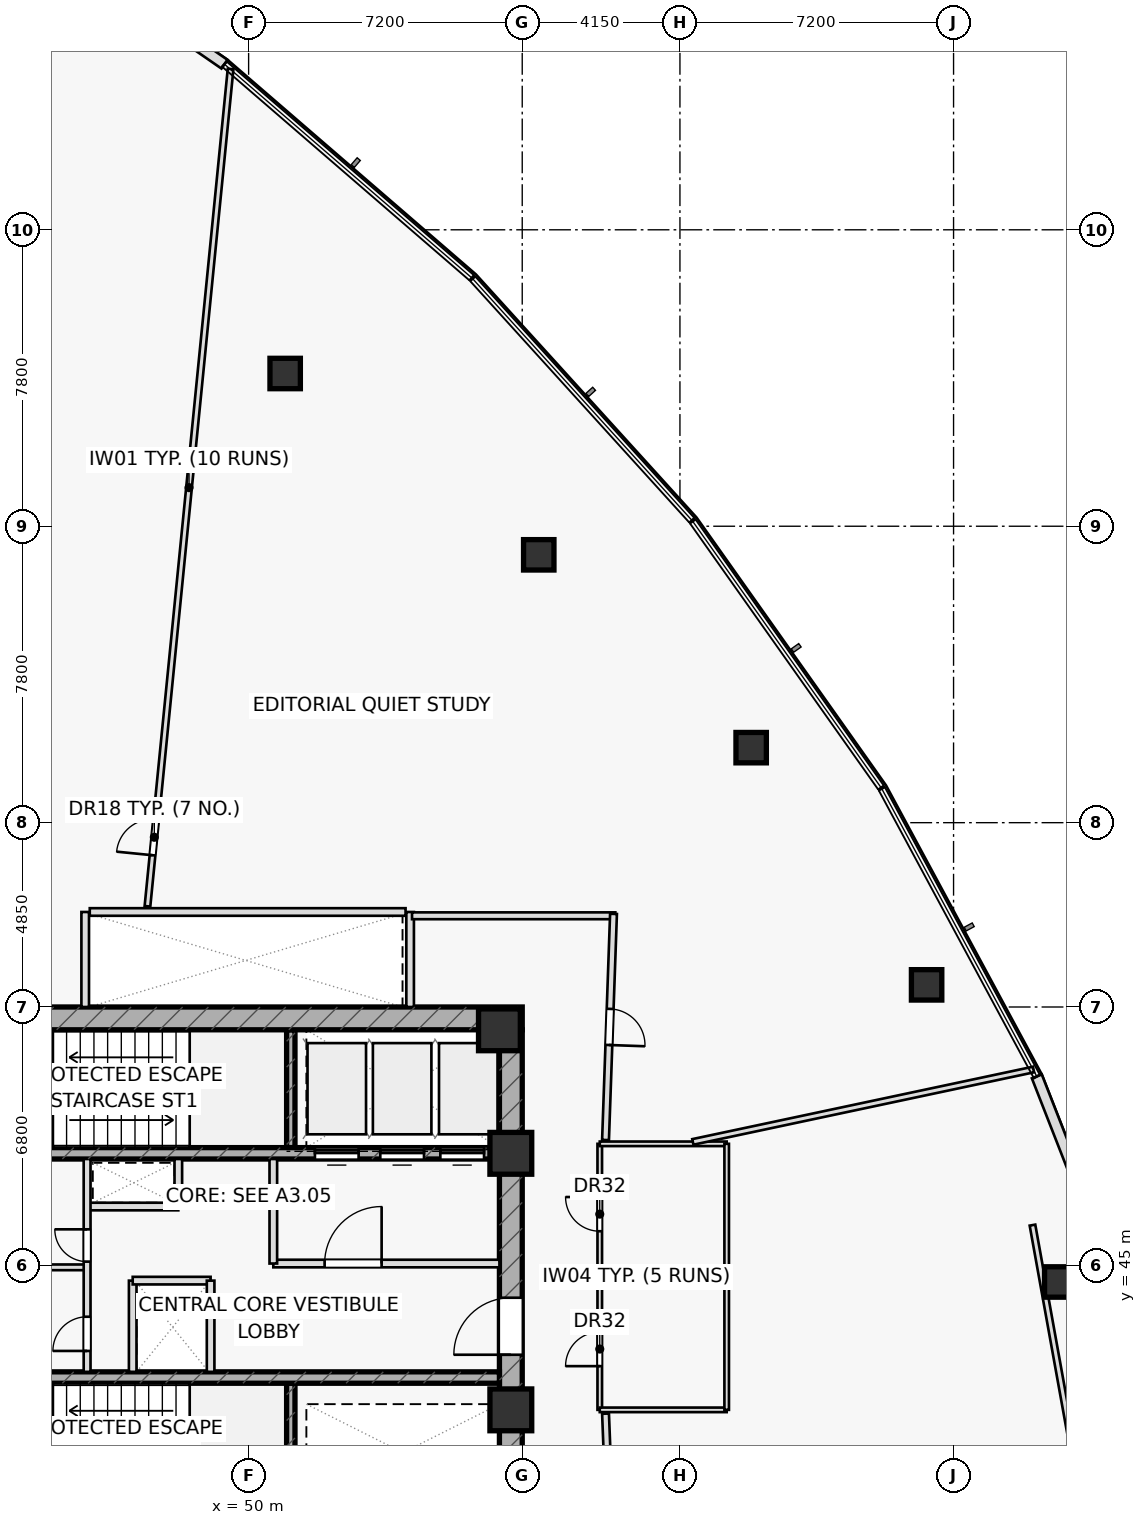
"""IFC4 building model, lengths in metres.
Left out: names, types, materials, properties, quantities, classifications, styles, units other than length and angle.
Written with IfcOpenShell. Run it as: python <this file> out.ifc"""

import sys

from ifc_helpers import new_model, si_unit, direction, frame, frame_2d, origin, origin_2d, place, context, subcontext, project, spatial, rectangle, hollow_rectangle, extrude, element, fill, save


model = new_model("IFC4")
c1 = context("Model", 3, precision=1e-05, world=origin(), true_north=direction((0.0, 1.0)))
c2 = subcontext(c1, "Body", "Model", "MODEL_VIEW")
j1 = project(units=[si_unit("LENGTHUNIT", "METRE"), si_unit("PLANEANGLEUNIT", "RADIAN")], contexts=[c1])
p1 = place(None, origin())
s1 = spatial("IfcSite", under=j1, at=p1, CompositionType="ELEMENT")
p2 = place(p1, origin())
s2 = spatial("IfcBuilding", under=s1, at=p2, CompositionType="ELEMENT")
p3 = place(p2, frame((0.0, 0.0, 31.5)))
s3 = spatial("IfcBuildingStorey", under=s2, at=p3, CompositionType="ELEMENT", Elevation=31.5)
for number, where, z_axis, x_axis in (
    (1, (51.11, 48.1, 0.0), (0.0, 0.0, 1.0), (0.0, 1.0, 0.0)),
    (2, (51.11, 38.8, 0.0), (0.0, 0.0, 1.0), (0.0, 1.0, 0.0)),
):
    element("IfcWall", number, at=place(p3, frame(where, z_axis=z_axis, x_axis=x_axis)), inside=s3, PredefinedType="SHEAR", context=c2, shape_type="SweptSolid", body=[
        extrude(rectangle(XDim=3.1, YDim=0.22, at=frame_2d((1.55, 0.0))), origin(), (0.0, 0.0, 1.0), 3.6),
    ])
p4 = place(p3, frame((42.8, 51.5, 0.0), z_axis=(0.0, 0.0, 1.0), x_axis=(1.0, 0.0, 0.0)))
e3 = element("IfcWall", 3, at=p4, inside=s3, PredefinedType="SHEAR", context=c2, shape_type="SweptSolid", body=[
    extrude(rectangle(XDim=14.4, YDim=0.6, at=frame_2d((7.2, 0.0))), origin(), (0.0, 0.0, 1.0), 3.6),
])
p5 = place(p4, frame((0.88, 0.0, 0.0)))
e4 = element("IfcOpeningElement", 4, at=p5, cuts=e3, PredefinedType="OPENING", context=c2, shape_type="SweptSolid", body=[
    extrude(rectangle(XDim=1.05, YDim=2.2, at=frame_2d((0.525, 1.1))), frame((0.0, 0.31, 0.0), z_axis=(0.0, -1.0, 0.0), x_axis=(1.0, 0.0, 0.0)), (0.0, 0.0, 1.0), 0.62),
])
p6 = place(p3, frame((56.9, 38.8, 0.0), z_axis=(0.0, 0.0, 1.0), x_axis=(0.0, 1.0, 0.0)))
e5 = element("IfcWall", 5, at=p6, inside=s3, PredefinedType="SHEAR", context=c2, shape_type="SweptSolid", body=[
    extrude(rectangle(XDim=12.4, YDim=0.6, at=frame_2d((6.2, 0.0))), origin(), (0.0, 0.0, 1.0), 3.6),
])
p7 = place(p6, frame((3.85, 0.0, 0.0)))
e6 = element("IfcOpeningElement", 6, at=p7, cuts=e5, PredefinedType="OPENING", context=c2, shape_type="SweptSolid", body=[
    extrude(rectangle(XDim=1.5, YDim=2.2, at=frame_2d((0.75, 1.1))), frame((0.0, 0.31, 0.0), z_axis=(0.0, -1.0, 0.0), x_axis=(1.0, 0.0, 0.0)), (0.0, 0.0, 1.0), 0.62),
])
p8 = place(p3, frame((43.4, 47.95, 0.0), z_axis=(0.0, 0.0, 1.0), x_axis=(1.0, 0.0, 0.0)))
e7 = element("IfcWall", 7, at=p8, inside=s3, PredefinedType="SHEAR", context=c2, shape_type="SweptSolid", body=[
    extrude(rectangle(XDim=13.2, YDim=0.3, at=frame_2d((6.6, 0.0))), origin(), (0.0, 0.0, 1.0), 3.6),
])
p9 = place(p8, frame((8.345, 0.0, 0.0)))
e8 = element("IfcOpeningElement", 8, at=p9, cuts=e7, PredefinedType="OPENING", context=c2, shape_type="SweptSolid", body=[
    extrude(rectangle(XDim=1.15, YDim=2.2, at=frame_2d((0.575, 1.1))), frame((0.0, 0.16, 0.0), z_axis=(0.0, -1.0, 0.0), x_axis=(1.0, 0.0, 0.0)), (0.0, 0.0, 1.0), 0.32),
])
p10 = place(p8, frame((10.065, 0.0, 0.0)))
e9 = element("IfcOpeningElement", 9, at=p10, cuts=e7, PredefinedType="OPENING", context=c2, shape_type="SweptSolid", body=[
    extrude(rectangle(XDim=1.15, YDim=2.2, at=frame_2d((0.575, 1.1))), frame((0.0, 0.16, 0.0), z_axis=(0.0, -1.0, 0.0), x_axis=(1.0, 0.0, 0.0)), (0.0, 0.0, 1.0), 0.32),
])
p11 = place(p8, frame((11.645, 0.0, 0.0)))
e10 = element("IfcOpeningElement", 10, at=p11, cuts=e7, PredefinedType="OPENING", context=c2, shape_type="SweptSolid", body=[
    extrude(rectangle(XDim=1.15, YDim=2.2, at=frame_2d((0.575, 1.1))), frame((0.0, 0.16, 0.0), z_axis=(0.0, -1.0, 0.0), x_axis=(1.0, 0.0, 0.0)), (0.0, 0.0, 1.0), 0.32),
])
p12 = place(p3, frame((43.4, 42.05, 0.0), z_axis=(0.0, 0.0, 1.0), x_axis=(1.0, 0.0, 0.0)))
e11 = element("IfcWall", 11, at=p12, inside=s3, PredefinedType="SHEAR", context=c2, shape_type="SweptSolid", body=[
    extrude(rectangle(XDim=13.2, YDim=0.3, at=frame_2d((6.6, 0.0))), origin(), (0.0, 0.0, 1.0), 3.6),
])
for number, where, z_axis, x_axis in (
    (12, (56.9, 47.95, 0.0), (0.0, 0.0, 1.0), (1.0, 0.0, 0.0)),
    (13, (56.6, 51.2, 0.0), (0.0, 0.0, 1.0), (1.0, 0.0, 0.0)),
    (14, (56.9, 41.2, 0.0), (0.0, 0.0, 1.0), (1.0, 0.0, 0.0)),
):
    element("IfcColumn", number, at=place(p3, frame(where, z_axis=z_axis, x_axis=x_axis)), inside=s3, PredefinedType="COLUMN", context=c2, shape_type="SweptSolid", body=[
        extrude(rectangle(XDim=1.1, YDim=1.1, at=origin_2d()), origin(), (0.0, 0.0, 1.0), 3.6),
    ])
for number, where, z_axis, x_axis in (
    (15, (71.344, 44.565, 0.0), (0.0, 0.0, 1.0), (1.0, 0.0, 0.0)),
    (16, (67.841, 52.383, 0.0), (0.0, 0.0, 1.0), (1.0, 0.0, 0.0)),
    (17, (63.224, 58.624, 0.0), (0.0, 0.0, 1.0), (1.0, 0.0, 0.0)),
    (18, (57.635, 63.698, 0.0), (0.0, 0.0, 1.0), (1.0, 0.0, 0.0)),
    (19, (50.962, 68.469, 0.0), (0.0, 0.0, 1.0), (1.0, 0.0, 0.0)),
):
    element("IfcColumn", number, at=place(p3, frame(where, z_axis=z_axis, x_axis=x_axis)), inside=s3, PredefinedType="COLUMN", context=c2, shape_type="SweptSolid", body=[
        extrude(hollow_rectangle(XDim=0.8, YDim=0.8, WallThickness=0.045, at=origin_2d()), origin(), (0.0, 0.0, 1.0), 3.6),
    ])
for number, where, z_axis, x_axis in (
    (20, (45.7, 51.8, 0.0), (0.0, 0.0, 1.0), (0.0, 1.0, 0.0)),
    (21, (54.25, 51.8, 0.0), (0.0, 0.0, 1.0), (0.0, 1.0, 0.0)),
):
    element("IfcWall", number, at=place(p3, frame(where, z_axis=z_axis, x_axis=x_axis)), inside=s3, PredefinedType="PARTITIONING", context=c2, shape_type="SweptSolid", body=[
        extrude(rectangle(XDim=2.5, YDim=0.2, at=frame_2d((1.25, 0.0))), origin(), (0.0, 0.0, 1.0), 3.6),
    ])
p13 = place(p3, frame((45.75, 46.55, 0.0), z_axis=(0.0, 0.0, 1.0), x_axis=(1.0, 0.0, 0.0)))
e22 = element("IfcWall", 22, at=p13, inside=s3, PredefinedType="PARTITIONING", context=c2, shape_type="SweptSolid", body=[
    extrude(rectangle(XDim=2.4, YDim=0.2, at=frame_2d((1.2, 0.0))), origin(), (0.0, 0.0, 1.0), 3.6),
])
p14 = place(p3, frame((48.15, 46.55, 0.0), z_axis=(0.0, 0.0, 1.0), x_axis=(0.0, 1.0, 0.0)))
e23 = element("IfcWall", 23, at=p14, inside=s3, PredefinedType="PARTITIONING", context=c2, shape_type="SweptSolid", body=[
    extrude(rectangle(XDim=1.25, YDim=0.2, at=frame_2d((0.625, 0.0))), origin(), (0.0, 0.0, 1.0), 3.6),
])
p15 = place(p3, frame((46.95, 42.2, 0.0), z_axis=(0.0, 0.0, 1.0), x_axis=(0.0, 1.0, 0.0)))
e24 = element("IfcWall", 24, at=p15, inside=s3, PredefinedType="PARTITIONING", context=c2, shape_type="SweptSolid", body=[
    extrude(rectangle(XDim=2.4, YDim=0.2, at=frame_2d((1.2, 0.0))), origin(), (0.0, 0.0, 1.0), 3.6),
])
p16 = place(p3, frame((46.95, 44.6, 0.0), z_axis=(0.0, 0.0, 1.0), x_axis=(1.0, 0.0, 0.0)))
e25 = element("IfcWall", 25, at=p16, inside=s3, PredefinedType="PARTITIONING", context=c2, shape_type="SweptSolid", body=[
    extrude(rectangle(XDim=2.05, YDim=0.2, at=frame_2d((1.025, 0.0))), origin(), (0.0, 0.0, 1.0), 3.6),
])
p17 = place(p3, frame((50.65, 45.05, 0.0), z_axis=(0.0, 0.0, 1.0), x_axis=(1.0, 0.0, 0.0)))
e26 = element("IfcWall", 26, at=p17, inside=s3, PredefinedType="PARTITIONING", context=c2, shape_type="SweptSolid", body=[
    extrude(rectangle(XDim=5.95, YDim=0.2, at=frame_2d((2.975, 0.0))), origin(), (0.0, 0.0, 1.0), 3.6),
])
p18 = place(p17, frame((1.35, 0.0, 0.0)))
e27 = element("IfcOpeningElement", 27, at=p18, cuts=e26, PredefinedType="OPENING", context=c2, shape_type="SweptSolid", body=[
    extrude(rectangle(XDim=1.5, YDim=2.2, at=frame_2d((0.75, 1.1))), frame((0.0, 0.11, 0.0), z_axis=(0.0, -1.0, 0.0), x_axis=(1.0, 0.0, 0.0)), (0.0, 0.0, 1.0), 0.22),
])
p19 = place(p3, frame((50.65, 45.05, 0.0), z_axis=(0.0, 0.0, 1.0), x_axis=(0.0, 1.0, 0.0)))
e28 = element("IfcWall", 28, at=p19, inside=s3, PredefinedType="PARTITIONING", context=c2, shape_type="SweptSolid", body=[
    extrude(rectangle(XDim=2.75, YDim=0.2, at=frame_2d((1.375, 0.0))), origin(), (0.0, 0.0, 1.0), 3.6),
])
p20 = place(p3, frame((43.4, 44.95, 0.0), z_axis=(0.0, 0.0, 1.0), x_axis=(1.0, 0.0, 0.0)))
e29 = element("IfcWall", 29, at=p20, inside=s3, PredefinedType="PARTITIONING", context=c2, shape_type="SweptSolid", body=[
    extrude(rectangle(XDim=2.35, YDim=0.15, at=frame_2d((1.175, 0.0))), origin(), (0.0, 0.0, 1.0), 3.6),
])
p21 = place(p3, frame((45.75, 42.2, 0.0), z_axis=(0.0, 0.0, 1.0), x_axis=(0.0, 1.0, 0.0)))
e30 = element("IfcWall", 30, at=p21, inside=s3, PredefinedType="PARTITIONING", context=c2, shape_type="SweptSolid", body=[
    extrude(rectangle(XDim=5.6, YDim=0.18, at=frame_2d((2.8, 0.0))), origin(), (0.0, 0.0, 1.0), 3.6),
])
p22 = place(p21, frame((0.55, 0.0, 0.0)))
e31 = element("IfcOpeningElement", 31, at=p22, cuts=e30, PredefinedType="OPENING", context=c2, shape_type="SweptSolid", body=[
    extrude(rectangle(XDim=0.9, YDim=2.05, at=frame_2d((0.45, 1.025))), frame((0.0, 0.1, 0.0), z_axis=(0.0, -1.0, 0.0), x_axis=(1.0, 0.0, 0.0)), (0.0, 0.0, 1.0), 0.2),
])
p23 = place(p21, frame((2.9, 0.0, 0.0)))
e32 = element("IfcOpeningElement", 32, at=p23, cuts=e30, PredefinedType="OPENING", context=c2, shape_type="SweptSolid", body=[
    extrude(rectangle(XDim=0.85, YDim=2.05, at=frame_2d((0.425, 1.025))), frame((0.0, 0.1, 0.0), z_axis=(0.0, -1.0, 0.0), x_axis=(1.0, 0.0, 0.0)), (0.0, 0.0, 1.0), 0.2),
])
p24 = place(p3, frame((72.969, 33.091, 0.0), z_axis=(0.0, 0.0, 1.0), x_axis=(-0.177742578179, 0.984077017261, 0.0)))
e33 = element("IfcWall", 33, at=p24, inside=s3, PredefinedType="PARTITIONING", context=c2, shape_type="SweptSolid", body=[
    extrude(rectangle(XDim=13.179, YDim=0.15, at=frame_2d((6.59, 0.0))), origin(), (0.0, 0.0, 1.0), 2.925),
])
p25 = place(p3, frame((59.24, 41.2, 0.0), z_axis=(0.0, 0.0, 1.0), x_axis=(0.0, 1.0, 0.0)))
e34 = element("IfcWall", 34, at=p25, inside=s3, PredefinedType="PARTITIONING", context=c2, shape_type="SweptSolid", body=[
    extrude(rectangle(XDim=7.0, YDim=0.12, at=frame_2d((3.5, 0.0))), origin(), (0.0, 0.0, 1.0), 3.6),
])
p26 = place(p25, frame((1.15, 0.0, 0.0)))
e35 = element("IfcOpeningElement", 35, at=p26, cuts=e34, PredefinedType="OPENING", context=c2, shape_type="SweptSolid", body=[
    extrude(rectangle(XDim=0.9, YDim=2.05, at=frame_2d((0.45, 1.025))), frame((0.0, 0.07, 0.0), z_axis=(0.0, -1.0, 0.0), x_axis=(1.0, 0.0, 0.0)), (0.0, 0.0, 1.0), 0.14),
])
p27 = place(p25, frame((4.7, 0.0, 0.0)))
e36 = element("IfcOpeningElement", 36, at=p27, cuts=e34, PredefinedType="OPENING", context=c2, shape_type="SweptSolid", body=[
    extrude(rectangle(XDim=0.9, YDim=2.05, at=frame_2d((0.45, 1.025))), frame((0.0, 0.07, 0.0), z_axis=(0.0, -1.0, 0.0), x_axis=(1.0, 0.0, 0.0)), (0.0, 0.0, 1.0), 0.14),
])
p28 = place(p3, frame((59.24, 41.2, 0.0), z_axis=(0.0, 0.0, 1.0), x_axis=(1.0, 0.0, 0.0)))
e37 = element("IfcWall", 37, at=p28, inside=s3, PredefinedType="PARTITIONING", context=c2, shape_type="SweptSolid", body=[
    extrude(rectangle(XDim=3.34, YDim=0.12, at=frame_2d((1.67, 0.0))), origin(), (0.0, 0.0, 1.0), 2.925),
])
for number, where, z_axis, x_axis in (
    (38, (59.24, 44.65, 0.0), (0.0, 0.0, 1.0), (1.0, 0.0, 0.0)),
    (39, (59.24, 48.2, 0.0), (0.0, 0.0, 1.0), (1.0, 0.0, 0.0)),
):
    element("IfcWall", number, at=place(p3, frame(where, z_axis=z_axis, x_axis=x_axis)), inside=s3, PredefinedType="PARTITIONING", context=c2, shape_type="SweptSolid", body=[
        extrude(rectangle(XDim=3.34, YDim=0.12, at=frame_2d((1.67, 0.0))), origin(), (0.0, 0.0, 1.0), 3.6),
    ])
p29 = place(p3, frame((62.58, 41.2, 0.0), z_axis=(0.0, 0.0, 1.0), x_axis=(0.0, 1.0, 0.0)))
e40 = element("IfcWall", 40, at=p29, inside=s3, PredefinedType="PARTITIONING", context=c2, shape_type="SweptSolid", body=[
    extrude(rectangle(XDim=7.0, YDim=0.12, at=frame_2d((3.5, 0.0))), origin(), (0.0, 0.0, 1.0), 3.6),
])
p30 = place(p3, frame((61.69, 48.25, 0.0), z_axis=(0.0, 0.0, 1.0), x_axis=(0.978145714451, 0.207920564881, 0.0)))
e41 = element("IfcWall", 41, at=p30, inside=s3, PredefinedType="PARTITIONING", context=c2, shape_type="SweptSolid", body=[
    extrude(rectangle(XDim=9.165, YDim=0.15, at=frame_2d((4.582, 0.0))), origin(), (0.0, 0.0, 1.0), 2.975),
])
p31 = place(p3, frame((47.338, 54.45, 0.0), z_axis=(0.0, 0.0, 1.0), x_axis=(0.098804932586, 0.995106821048, 0.0)))
e42 = element("IfcWall", 42, at=p31, inside=s3, PredefinedType="PARTITIONING", context=c2, shape_type="SweptSolid", body=[
    extrude(rectangle(XDim=22.14, YDim=0.15, at=frame_2d((11.07, 0.0))), origin(), (0.0, 0.0, 1.0), 2.975),
])
p32 = place(p31, frame((1.35, 0.0, 0.0)))
e43 = element("IfcOpeningElement", 43, at=p32, cuts=e42, PredefinedType="OPENING", context=c2, shape_type="SweptSolid", body=[
    extrude(rectangle(XDim=0.95, YDim=2.05, at=frame_2d((0.475, 1.025))), frame((0.0, 0.085, 0.0), z_axis=(0.0, -1.0, 0.0), x_axis=(1.0, 0.0, 0.0)), (0.0, 0.0, 1.0), 0.17),
])
p33 = place(p3, frame((54.3, 54.2, 0.0), z_axis=(0.0, 0.0, 1.0), x_axis=(1.0, 0.0, 0.0)))
e44 = element("IfcWall", 44, at=p33, inside=s3, PredefinedType="PARTITIONING", context=c2, shape_type="SweptSolid", body=[
    extrude(rectangle(XDim=5.35, YDim=0.18, at=frame_2d((2.675, 0.0))), origin(), (0.0, 0.0, 1.0), 2.925),
])
p34 = place(p3, frame((59.602, 54.25, 0.0), z_axis=(0.0, 0.0, 1.0), x_axis=(-0.035265891834, -0.999377964973, 0.0)))
e45 = element("IfcWall", 45, at=p34, inside=s3, PredefinedType="PARTITIONING", context=c2, shape_type="SweptSolid", body=[
    extrude(rectangle(XDim=5.954, YDim=0.18, at=frame_2d((2.977, 0.0))), origin(), (0.0, 0.0, 1.0), 2.925),
])
p35 = place(p34, frame((2.502, 0.0, 0.0)))
e46 = element("IfcOpeningElement", 46, at=p35, cuts=e45, PredefinedType="OPENING", context=c2, shape_type="SweptSolid", body=[
    extrude(rectangle(XDim=0.95, YDim=2.05, at=frame_2d((0.475, 1.025))), frame((0.0, 0.1, 0.0), z_axis=(0.0, -1.0, 0.0), x_axis=(1.0, 0.0, 0.0)), (0.0, 0.0, 1.0), 0.2),
])
p36 = place(p3, frame((59.392, 41.1, 0.0), z_axis=(0.0, 0.0, 1.0), x_axis=(0.03921413315, -0.999230830069, 0.0)))
e47 = element("IfcWall", 47, at=p36, inside=s3, PredefinedType="PARTITIONING", context=c2, shape_type="SweptSolid", body=[
    extrude(rectangle(XDim=5.354, YDim=0.18, at=frame_2d((2.677, 0.0))), origin(), (0.0, 0.0, 1.0), 2.925),
])
p37 = place(p36, frame((2.037, 0.0, 0.0)))
e48 = element("IfcOpeningElement", 48, at=p37, cuts=e47, PredefinedType="OPENING", context=c2, shape_type="SweptSolid", body=[
    extrude(rectangle(XDim=0.95, YDim=2.05, at=frame_2d((0.475, 1.025))), frame((0.0, 0.1, 0.0), z_axis=(0.0, -1.0, 0.0), x_axis=(1.0, 0.0, 0.0)), (0.0, 0.0, 1.0), 0.2),
])
p38 = place(p3, frame((49.365, 76.607, 0.0), z_axis=(0.0, 0.0, 1.0), x_axis=(-0.822668510747, 0.568521346499, 0.0)))
e49 = element("IfcWall", 49, at=p38, inside=s3, PredefinedType="STANDARD", context=c2, shape_type="SweptSolid", body=[
    extrude(rectangle(XDim=2.25, YDim=0.28, at=frame_2d((1.125, 0.0))), origin(), (0.0, 0.0, 1.0), 3.6),
])
p39 = place(p3, frame((73.889, 41.932, 0.0), z_axis=(0.0, 0.0, 1.0), x_axis=(-0.364469689699, 0.931215251857, 0.0)))
e50 = element("IfcWall", 50, at=p39, inside=s3, PredefinedType="STANDARD", context=c2, shape_type="SweptSolid", body=[
    extrude(rectangle(XDim=8.637, YDim=0.28, at=frame_2d((4.318, 0.0))), origin(), (0.0, 0.0, 1.0), 3.6),
])
p40 = place(p3, frame((49.0, 42.2, 0.0), z_axis=(0.0, 0.0, 1.0), x_axis=(0.0, 1.0, 0.0)))
e51 = element("IfcWall", 51, at=p40, inside=s3, PredefinedType="PARTITIONING", context=c2, shape_type="SweptSolid", body=[
    extrude(rectangle(XDim=2.4, YDim=0.2, at=frame_2d((1.2, 0.0))), origin(), (0.0, 0.0, 1.0), 3.6),
])
p41 = place(p3, frame((45.82, 54.3, 0.0), z_axis=(0.0, 0.0, 1.0), x_axis=(1.0, 0.0, 0.0)))
e52 = element("IfcWall", 52, at=p41, inside=s3, PredefinedType="PARTITIONING", context=c2, shape_type="SweptSolid", body=[
    extrude(rectangle(XDim=8.31, YDim=0.2, at=frame_2d((4.155, 0.0))), origin(), (0.0, 0.0, 1.0), 3.6),
])
p42 = place(p7, origin())
e53 = element("IfcDoor", 53, at=p42, inside=s3, OperationType="SINGLE_SWING_LEFT", PredefinedType="DOOR", context=c2, shape_type="SweptSolid", body=[
    extrude(rectangle(XDim=1.5, YDim=2.2, at=frame_2d((0.75, 1.1))), frame((0.0, 0.025, 0.0), z_axis=(0.0, -1.0, 0.0), x_axis=(1.0, 0.0, 0.0)), (0.0, 0.0, 1.0), 0.05),
])
fill(e6, e53)
p43 = place(p18, origin())
e54 = element("IfcDoor", 54, at=p43, inside=s3, OperationType="SINGLE_SWING_RIGHT", PredefinedType="DOOR", context=c2, shape_type="SweptSolid", body=[
    extrude(rectangle(XDim=1.5, YDim=2.2, at=frame_2d((0.75, 1.1))), frame((0.0, 0.025, 0.0), z_axis=(0.0, -1.0, 0.0), x_axis=(1.0, 0.0, 0.0)), (0.0, 0.0, 1.0), 0.05),
])
fill(e27, e54)
p44 = place(p22, origin())
e55 = element("IfcDoor", 55, at=p44, inside=s3, OperationType="SINGLE_SWING_LEFT", PredefinedType="DOOR", context=c2, shape_type="SweptSolid", body=[
    extrude(rectangle(XDim=0.9, YDim=2.05, at=frame_2d((0.45, 1.025))), frame((0.0, 0.025, 0.0), z_axis=(0.0, -1.0, 0.0), x_axis=(1.0, 0.0, 0.0)), (0.0, 0.0, 1.0), 0.05),
])
fill(e31, e55)
p45 = place(p23, origin())
e56 = element("IfcDoor", 56, at=p45, inside=s3, OperationType="SINGLE_SWING_RIGHT", PredefinedType="DOOR", context=c2, shape_type="SweptSolid", body=[
    extrude(rectangle(XDim=0.85, YDim=2.05, at=frame_2d((0.425, 1.025))), frame((0.0, 0.025, 0.0), z_axis=(0.0, -1.0, 0.0), x_axis=(1.0, 0.0, 0.0)), (0.0, 0.0, 1.0), 0.05),
])
fill(e32, e56)
p46 = place(p26, origin())
e57 = element("IfcDoor", 57, at=p46, inside=s3, OperationType="SINGLE_SWING_LEFT", PredefinedType="DOOR", context=c2, shape_type="SweptSolid", body=[
    extrude(rectangle(XDim=0.9, YDim=2.05, at=frame_2d((0.45, 1.025))), frame((0.0, 0.025, 0.0), z_axis=(0.0, -1.0, 0.0), x_axis=(1.0, 0.0, 0.0)), (0.0, 0.0, 1.0), 0.05),
])
fill(e35, e57)
p47 = place(p27, origin())
e58 = element("IfcDoor", 58, at=p47, inside=s3, OperationType="SINGLE_SWING_RIGHT", PredefinedType="DOOR", context=c2, shape_type="SweptSolid", body=[
    extrude(rectangle(XDim=0.9, YDim=2.05, at=frame_2d((0.45, 1.025))), frame((0.0, 0.025, 0.0), z_axis=(0.0, -1.0, 0.0), x_axis=(1.0, 0.0, 0.0)), (0.0, 0.0, 1.0), 0.05),
])
fill(e36, e58)
p48 = place(p32, origin())
e59 = element("IfcDoor", 59, at=p48, inside=s3, OperationType="SINGLE_SWING_LEFT", PredefinedType="DOOR", context=c2, shape_type="SweptSolid", body=[
    extrude(rectangle(XDim=0.95, YDim=2.05, at=frame_2d((0.475, 1.025))), frame((0.0, 0.025, 0.0), z_axis=(0.0, -1.0, 0.0), x_axis=(1.0, 0.0, 0.0)), (0.0, 0.0, 1.0), 0.05),
])
fill(e43, e59)
p49 = place(p35, origin())
e60 = element("IfcDoor", 60, at=p49, inside=s3, OperationType="SINGLE_SWING_RIGHT", PredefinedType="DOOR", context=c2, shape_type="SweptSolid", body=[
    extrude(rectangle(XDim=0.95, YDim=2.05, at=frame_2d((0.475, 1.025))), frame((0.0, 0.025, 0.0), z_axis=(0.0, -1.0, 0.0), x_axis=(1.0, 0.0, 0.0)), (0.0, 0.0, 1.0), 0.05),
])
fill(e46, e60)
p50 = place(p9, origin())
e61 = element("IfcDoor", 61, at=p50, inside=s3, OperationType="SLIDING_TO_LEFT", PredefinedType="DOOR", context=c2, shape_type="SweptSolid", body=[
    extrude(rectangle(XDim=1.15, YDim=2.2, at=frame_2d((0.575, 1.1))), frame((0.0, 0.025, 0.0), z_axis=(0.0, -1.0, 0.0), x_axis=(1.0, 0.0, 0.0)), (0.0, 0.0, 1.0), 0.05),
])
fill(e8, e61)
p51 = place(p10, origin())
e62 = element("IfcDoor", 62, at=p51, inside=s3, OperationType="SLIDING_TO_LEFT", PredefinedType="DOOR", context=c2, shape_type="SweptSolid", body=[
    extrude(rectangle(XDim=1.15, YDim=2.2, at=frame_2d((0.575, 1.1))), frame((0.0, 0.025, 0.0), z_axis=(0.0, -1.0, 0.0), x_axis=(1.0, 0.0, 0.0)), (0.0, 0.0, 1.0), 0.05),
])
fill(e9, e62)
p52 = place(p11, origin())
e63 = element("IfcDoor", 63, at=p52, inside=s3, OperationType="SLIDING_TO_LEFT", PredefinedType="DOOR", context=c2, shape_type="SweptSolid", body=[
    extrude(rectangle(XDim=1.15, YDim=2.2, at=frame_2d((0.575, 1.1))), frame((0.0, 0.025, 0.0), z_axis=(0.0, -1.0, 0.0), x_axis=(1.0, 0.0, 0.0)), (0.0, 0.0, 1.0), 0.05),
])
fill(e10, e63)
save(model, sys.argv[1])
